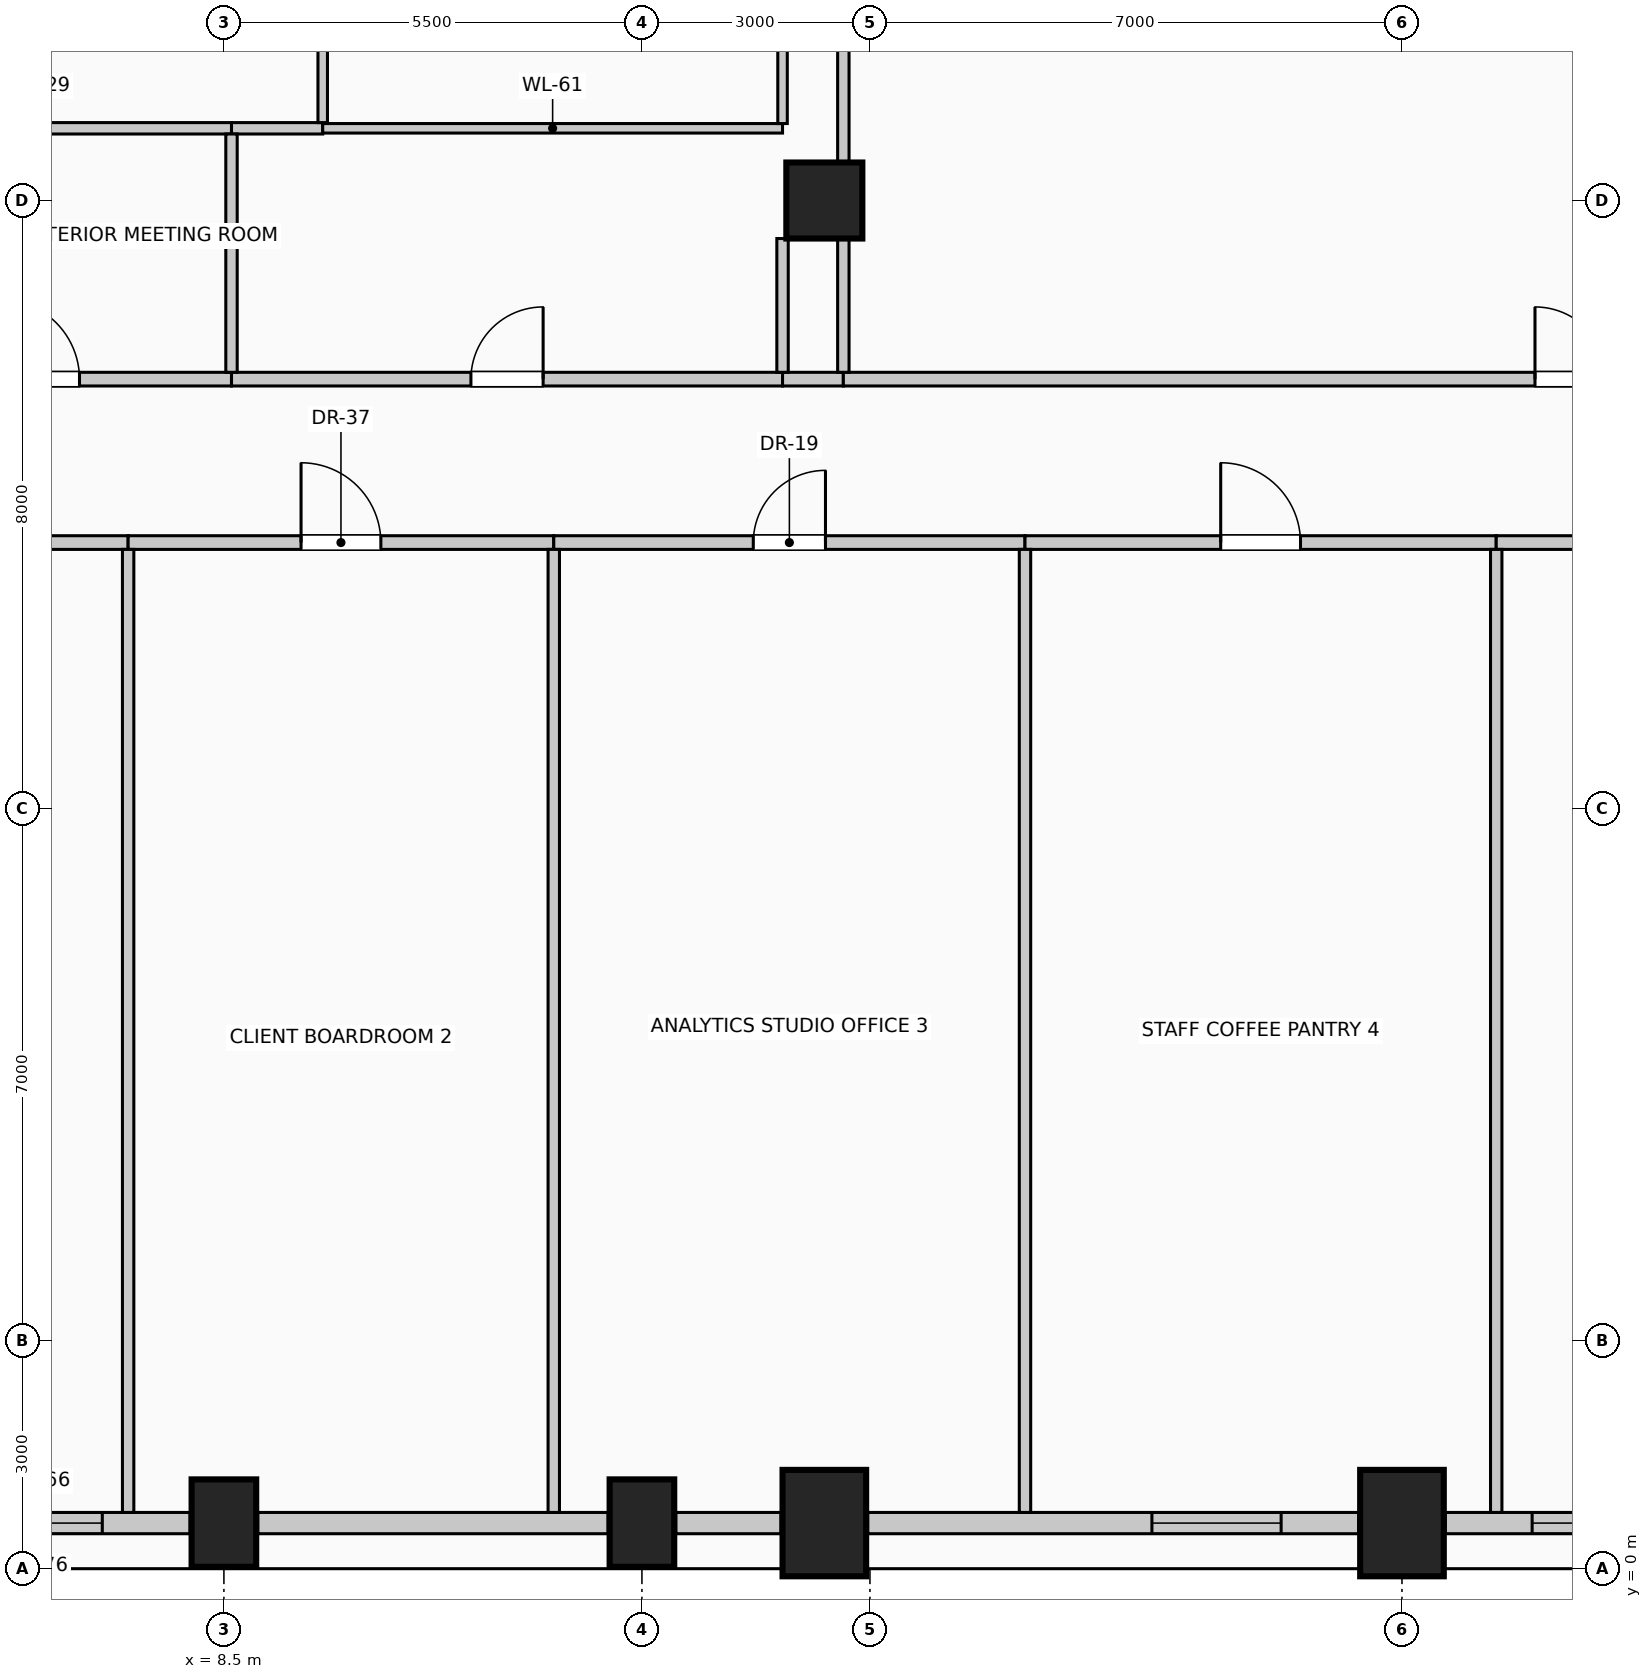
"""IFC4 building model, lengths in metres.
Left out: names, types, materials, properties, quantities, classifications, styles, units other than length and angle.
Written with IfcOpenShell. Run it as: python <this file> out.ifc"""

import sys

from ifc_helpers import new_model, si_unit, direction, frame, frame_2d, origin, origin_2d, place, context, subcontext, project, spatial, rectangle, circle, extrude, element, fill, save


model = new_model("IFC4")
c1 = context("Model", 3, precision=1e-05, world=origin(), true_north=direction((0.0, 1.0)))
c2 = subcontext(c1, "Body", "Model", "MODEL_VIEW")
j1 = project(units=[si_unit("LENGTHUNIT", "METRE"), si_unit("PLANEANGLEUNIT", "RADIAN")], contexts=[c1])
p1 = place(None, origin())
s1 = spatial("IfcSite", under=j1, at=p1, CompositionType="ELEMENT")
p2 = place(p1, origin())
s2 = spatial("IfcBuilding", under=s1, at=p2, CompositionType="ELEMENT")
p3 = place(p2, frame((0.0, 0.0, 144.6)))
s3 = spatial("IfcBuildingStorey", under=s2, at=p3, CompositionType="ELEMENT", Elevation=144.6)
for number, where, z_axis, x_axis in (
    (1, (8.5, 0.6, 0.0), (0.0, 0.0, 1.0), (1.0, 0.0, 0.0)),
    (2, (14.0, 0.6, 0.0), (0.0, 0.0, 1.0), (1.0, 0.0, 0.0)),
):
    element("IfcColumn", number, at=place(p3, frame(where, z_axis=z_axis, x_axis=x_axis)), inside=s3, PredefinedType="COLUMN", context=c2, shape_type="SweptSolid", body=[
        extrude(rectangle(XDim=0.85, YDim=1.15, at=origin_2d()), origin(), (0.0, 0.0, 1.0), 4.0),
    ])
for number, where, z_axis, x_axis in (
    (3, (16.4, 0.6, 0.0), (0.0, 0.0, 1.0), (1.0, 0.0, 0.0)),
    (4, (24.0, 0.6, 0.0), (0.0, 0.0, 1.0), (1.0, 0.0, 0.0)),
):
    element("IfcColumn", number, at=place(p3, frame(where, z_axis=z_axis, x_axis=x_axis)), inside=s3, PredefinedType="COLUMN", context=c2, shape_type="SweptSolid", body=[
        extrude(rectangle(XDim=1.1, YDim=1.4, at=origin_2d()), origin(), (0.0, 0.0, 1.0), 4.0),
    ])
p4 = place(p3, frame((16.4, 18.0, 0.0), z_axis=(0.0, 0.0, 1.0), x_axis=(1.0, 0.0, 0.0)))
e5 = element("IfcColumn", 5, at=p4, inside=s3, PredefinedType="COLUMN", context=c2, shape_type="SweptSolid", body=[
    extrude(circle(Radius=0.5, at=origin_2d()), origin(), (0.0, 0.0, 1.0), 4.0),
])
p5 = place(p3, frame((8.055, 0.6, 0.0), z_axis=(0.0, 0.0, 1.0), x_axis=(-1.0, 0.0, 0.0)))
e6 = element("IfcWall", 6, at=p5, inside=s3, PredefinedType="SOLIDWALL", context=c2, shape_type="SweptSolid", body=[
    extrude(rectangle(XDim=4.01, YDim=0.28, at=frame_2d((2.005, 0.0))), origin(), (0.0, 0.0, 1.0), 2.875),
])
p6 = place(p5, frame((1.155, 0.0, 0.5)))
e7 = element("IfcOpeningElement", 7, at=p6, cuts=e6, PredefinedType="OPENING", context=c2, shape_type="SweptSolid", body=[
    extrude(rectangle(XDim=1.7, YDim=1.95, at=frame_2d((0.85, 0.975))), frame((0.0, 0.15, 0.0), z_axis=(0.0, -1.0, 0.0), x_axis=(1.0, 0.0, 0.0)), (0.0, 0.0, 1.0), 0.3),
])
p7 = place(p3, frame((13.555, 0.6, 0.0), z_axis=(0.0, 0.0, 1.0), x_axis=(-1.0, 0.0, 0.0)))
e8 = element("IfcWall", 8, at=p7, inside=s3, PredefinedType="SOLIDWALL", context=c2, shape_type="SweptSolid", body=[
    extrude(rectangle(XDim=4.61, YDim=0.28, at=frame_2d((2.305, 0.0))), origin(), (0.0, 0.0, 1.0), 2.875),
])
p8 = place(p3, frame((15.83, 0.6, 0.0), z_axis=(0.0, 0.0, 1.0), x_axis=(-1.0, 0.0, 0.0)))
e9 = element("IfcWall", 9, at=p8, inside=s3, PredefinedType="SOLIDWALL", context=c2, shape_type="SweptSolid", body=[
    extrude(rectangle(XDim=1.385, YDim=0.28, at=frame_2d((0.692, 0.0))), origin(), (0.0, 0.0, 1.0), 2.875),
])
p9 = place(p3, frame((23.43, 0.6, 0.0), z_axis=(0.0, 0.0, 1.0), x_axis=(-1.0, 0.0, 0.0)))
e10 = element("IfcWall", 10, at=p9, inside=s3, PredefinedType="SOLIDWALL", context=c2, shape_type="SweptSolid", body=[
    extrude(rectangle(XDim=6.46, YDim=0.28, at=frame_2d((3.23, 0.0))), origin(), (0.0, 0.0, 1.0), 2.875),
])
p10 = place(p9, frame((1.02, 0.0, 0.5)))
e11 = element("IfcOpeningElement", 11, at=p10, cuts=e10, PredefinedType="OPENING", context=c2, shape_type="SweptSolid", body=[
    extrude(rectangle(XDim=1.7, YDim=1.95, at=frame_2d((0.85, 0.975))), frame((0.0, 0.15, 0.0), z_axis=(0.0, -1.0, 0.0), x_axis=(1.0, 0.0, 0.0)), (0.0, 0.0, 1.0), 0.3),
])
p11 = place(p3, frame((28.555, 0.6, 0.0), z_axis=(0.0, 0.0, 1.0), x_axis=(-1.0, 0.0, 0.0)))
e12 = element("IfcWall", 12, at=p11, inside=s3, PredefinedType="SOLIDWALL", context=c2, shape_type="SweptSolid", body=[
    extrude(rectangle(XDim=3.985, YDim=0.28, at=frame_2d((1.992, 0.0))), origin(), (0.0, 0.0, 1.0), 2.875),
])
p12 = place(p11, frame((1.143, 0.0, 0.5)))
e13 = element("IfcOpeningElement", 13, at=p12, cuts=e12, PredefinedType="OPENING", context=c2, shape_type="SweptSolid", body=[
    extrude(rectangle(XDim=1.7, YDim=1.95, at=frame_2d((0.85, 0.975))), frame((0.0, 0.15, 0.0), z_axis=(0.0, -1.0, 0.0), x_axis=(1.0, 0.0, 0.0)), (0.0, 0.0, 1.0), 0.3),
])
p13 = place(p3, frame((0.74, 13.5, 0.0), z_axis=(0.0, 0.0, 1.0), x_axis=(1.0, 0.0, 0.0)))
e14 = element("IfcWall", 14, at=p13, inside=s3, PredefinedType="PARTITIONING", context=c2, shape_type="SweptSolid", body=[
    extrude(rectangle(XDim=6.5, YDim=0.18, at=frame_2d((3.25, 0.0))), origin(), (0.0, 0.0, 1.0), 3.725),
])
p14 = place(p13, frame((2.775, 0.0, 0.0)))
e15 = element("IfcOpeningElement", 15, at=p14, cuts=e14, PredefinedType="OPENING", context=c2, shape_type="SweptSolid", body=[
    extrude(rectangle(XDim=0.95, YDim=2.15, at=frame_2d((0.475, 1.075))), frame((0.0, 0.1, 0.0), z_axis=(0.0, -1.0, 0.0), x_axis=(1.0, 0.0, 0.0)), (0.0, 0.0, 1.0), 0.2),
])
p15 = place(p3, frame((7.24, 13.5, 0.0), z_axis=(0.0, 0.0, 1.0), x_axis=(1.0, 0.0, 0.0)))
e16 = element("IfcWall", 16, at=p15, inside=s3, PredefinedType="PARTITIONING", context=c2, shape_type="SweptSolid", body=[
    extrude(rectangle(XDim=5.6, YDim=0.18, at=frame_2d((2.8, 0.0))), origin(), (0.0, 0.0, 1.0), 3.725),
])
p16 = place(p15, frame((2.275, 0.0, 0.0)))
e17 = element("IfcOpeningElement", 17, at=p16, cuts=e16, PredefinedType="OPENING", context=c2, shape_type="SweptSolid", body=[
    extrude(rectangle(XDim=1.05, YDim=2.15, at=frame_2d((0.525, 1.075))), frame((0.0, 0.1, 0.0), z_axis=(0.0, -1.0, 0.0), x_axis=(1.0, 0.0, 0.0)), (0.0, 0.0, 1.0), 0.2),
])
p17 = place(p3, frame((12.84, 13.5, 0.0), z_axis=(0.0, 0.0, 1.0), x_axis=(1.0, 0.0, 0.0)))
e18 = element("IfcWall", 18, at=p17, inside=s3, PredefinedType="PARTITIONING", context=c2, shape_type="SweptSolid", body=[
    extrude(rectangle(XDim=6.2, YDim=0.18, at=frame_2d((3.1, 0.0))), origin(), (0.0, 0.0, 1.0), 3.725),
])
p18 = place(p17, frame((2.625, 0.0, 0.0)))
e19 = element("IfcOpeningElement", 19, at=p18, cuts=e18, PredefinedType="OPENING", context=c2, shape_type="SweptSolid", body=[
    extrude(rectangle(XDim=0.95, YDim=2.15, at=frame_2d((0.475, 1.075))), frame((0.0, 0.1, 0.0), z_axis=(0.0, -1.0, 0.0), x_axis=(1.0, 0.0, 0.0)), (0.0, 0.0, 1.0), 0.2),
])
p19 = place(p3, frame((19.04, 13.5, 0.0), z_axis=(0.0, 0.0, 1.0), x_axis=(1.0, 0.0, 0.0)))
e20 = element("IfcWall", 20, at=p19, inside=s3, PredefinedType="PARTITIONING", context=c2, shape_type="SweptSolid", body=[
    extrude(rectangle(XDim=6.2, YDim=0.18, at=frame_2d((3.1, 0.0))), origin(), (0.0, 0.0, 1.0), 3.725),
])
p20 = place(p19, frame((2.575, 0.0, 0.0)))
e21 = element("IfcOpeningElement", 21, at=p20, cuts=e20, PredefinedType="OPENING", context=c2, shape_type="SweptSolid", body=[
    extrude(rectangle(XDim=1.05, YDim=2.15, at=frame_2d((0.525, 1.075))), frame((0.0, 0.1, 0.0), z_axis=(0.0, -1.0, 0.0), x_axis=(1.0, 0.0, 0.0)), (0.0, 0.0, 1.0), 0.2),
])
p21 = place(p3, frame((25.24, 13.5, 0.0), z_axis=(0.0, 0.0, 1.0), x_axis=(1.0, 0.0, 0.0)))
e22 = element("IfcWall", 22, at=p21, inside=s3, PredefinedType="PARTITIONING", context=c2, shape_type="SweptSolid", body=[
    extrude(rectangle(XDim=6.4, YDim=0.18, at=frame_2d((3.2, 0.0))), origin(), (0.0, 0.0, 1.0), 3.725),
])
p22 = place(p21, frame((2.725, 0.0, 0.0)))
e23 = element("IfcOpeningElement", 23, at=p22, cuts=e22, PredefinedType="OPENING", context=c2, shape_type="SweptSolid", body=[
    extrude(rectangle(XDim=0.95, YDim=2.15, at=frame_2d((0.475, 1.075))), frame((0.0, 0.1, 0.0), z_axis=(0.0, -1.0, 0.0), x_axis=(1.0, 0.0, 0.0)), (0.0, 0.0, 1.0), 0.2),
])
p23 = place(p3, frame((3.55, 15.65, 0.0), z_axis=(0.0, 0.0, 1.0), x_axis=(1.0, 0.0, 0.0)))
e24 = element("IfcWall", 24, at=p23, inside=s3, PredefinedType="PARTITIONING", context=c2, shape_type="SweptSolid", body=[
    extrude(rectangle(XDim=5.05, YDim=0.18, at=frame_2d((2.525, 0.0))), origin(), (0.0, 0.0, 1.0), 3.725),
])
p24 = place(p23, frame((2.0, 0.0, 0.0)))
e25 = element("IfcOpeningElement", 25, at=p24, cuts=e24, PredefinedType="OPENING", context=c2, shape_type="SweptSolid", body=[
    extrude(rectangle(XDim=1.05, YDim=2.15, at=frame_2d((0.525, 1.075))), frame((0.0, 0.1, 0.0), z_axis=(0.0, -1.0, 0.0), x_axis=(1.0, 0.0, 0.0)), (0.0, 0.0, 1.0), 0.2),
])
p25 = place(p3, frame((8.6, 15.65, 0.0), z_axis=(0.0, 0.0, 1.0), x_axis=(1.0, 0.0, 0.0)))
e26 = element("IfcWall", 26, at=p25, inside=s3, PredefinedType="PARTITIONING", context=c2, shape_type="SweptSolid", body=[
    extrude(rectangle(XDim=7.25, YDim=0.18, at=frame_2d((3.625, 0.0))), origin(), (0.0, 0.0, 1.0), 3.725),
])
p26 = place(p25, frame((3.15, 0.0, 0.0)))
e27 = element("IfcOpeningElement", 27, at=p26, cuts=e26, PredefinedType="OPENING", context=c2, shape_type="SweptSolid", body=[
    extrude(rectangle(XDim=0.95, YDim=2.15, at=frame_2d((0.475, 1.075))), frame((0.0, 0.1, 0.0), z_axis=(0.0, -1.0, 0.0), x_axis=(1.0, 0.0, 0.0)), (0.0, 0.0, 1.0), 0.2),
])
p27 = place(p3, frame((15.85, 15.65, 0.0), z_axis=(0.0, 0.0, 1.0), x_axis=(1.0, 0.0, 0.0)))
e28 = element("IfcWall", 28, at=p27, inside=s3, PredefinedType="PARTITIONING", context=c2, shape_type="SweptSolid", body=[
    extrude(rectangle(XDim=0.8, YDim=0.18, at=frame_2d((0.4, 0.0))), origin(), (0.0, 0.0, 1.0), 3.725),
])
p28 = place(p3, frame((16.65, 15.65, 0.0), z_axis=(0.0, 0.0, 1.0), x_axis=(1.0, 0.0, 0.0)))
e29 = element("IfcWall", 29, at=p28, inside=s3, PredefinedType="PARTITIONING", context=c2, shape_type="SweptSolid", body=[
    extrude(rectangle(XDim=19.15, YDim=0.18, at=frame_2d((9.575, 0.0))), origin(), (0.0, 0.0, 1.0), 3.725),
])
p29 = place(p28, frame((9.1, 0.0, 0.0)))
e30 = element("IfcOpeningElement", 30, at=p29, cuts=e29, PredefinedType="OPENING", context=c2, shape_type="SweptSolid", body=[
    extrude(rectangle(XDim=0.95, YDim=2.15, at=frame_2d((0.475, 1.075))), frame((0.0, 0.1, 0.0), z_axis=(0.0, -1.0, 0.0), x_axis=(1.0, 0.0, 0.0)), (0.0, 0.0, 1.0), 0.2),
])
p30 = place(p3, frame((3.55, 18.95, 0.0), z_axis=(0.0, 0.0, 1.0), x_axis=(1.0, 0.0, 0.0)))
e31 = element("IfcWall", 31, at=p30, inside=s3, PredefinedType="PARTITIONING", context=c2, shape_type="SweptSolid", body=[
    extrude(rectangle(XDim=5.05, YDim=0.15, at=frame_2d((2.525, 0.0))), origin(), (0.0, 0.0, 1.0), 3.725),
])
p31 = place(p3, frame((8.6, 18.95, 0.0), z_axis=(0.0, 0.0, 1.0), x_axis=(1.0, 0.0, 0.0)))
e32 = element("IfcWall", 32, at=p31, inside=s3, PredefinedType="PARTITIONING", context=c2, shape_type="SweptSolid", body=[
    extrude(rectangle(XDim=1.2, YDim=0.15, at=frame_2d((0.6, 0.0))), origin(), (0.0, 0.0, 1.0), 3.725),
])
p32 = place(p3, frame((9.8, 18.95, 0.0), z_axis=(0.0, 0.0, 1.0), x_axis=(1.0, 0.0, 0.0)))
e33 = element("IfcWall", 33, at=p32, inside=s3, PredefinedType="PARTITIONING", context=c2, shape_type="SweptSolid", body=[
    extrude(rectangle(XDim=6.05, YDim=0.125, at=frame_2d((3.025, 0.0))), origin(), (0.0, 0.0, 1.0), 3.725),
])
p33 = place(p3, frame((7.24, 0.74, 0.0), z_axis=(0.0, 0.0, 1.0), x_axis=(0.0, 1.0, 0.0)))
e34 = element("IfcWall", 34, at=p33, inside=s3, PredefinedType="PARTITIONING", context=c2, shape_type="SweptSolid", body=[
    extrude(rectangle(XDim=12.67, YDim=0.15, at=frame_2d((6.335, 0.0))), origin(), (0.0, 0.0, 1.0), 3.725),
])
p34 = place(p3, frame((8.6, 15.74, 0.0), z_axis=(0.0, 0.0, 1.0), x_axis=(0.0, 1.0, 0.0)))
e35 = element("IfcWall", 35, at=p34, inside=s3, PredefinedType="PARTITIONING", context=c2, shape_type="SweptSolid", body=[
    extrude(rectangle(XDim=3.135, YDim=0.15, at=frame_2d((1.567, 0.0))), origin(), (0.0, 0.0, 1.0), 3.725),
])
p35 = place(p3, frame((9.8, 19.025, 0.0), z_axis=(0.0, 0.0, 1.0), x_axis=(0.0, 1.0, 0.0)))
e36 = element("IfcWall", 36, at=p35, inside=s3, PredefinedType="PARTITIONING", context=c2, shape_type="SweptSolid", body=[
    extrude(rectangle(XDim=5.7, YDim=0.125, at=frame_2d((2.85, 0.0))), origin(), (0.0, 0.0, 1.0), 3.725),
])
p36 = place(p3, frame((12.84, 0.74, 0.0), z_axis=(0.0, 0.0, 1.0), x_axis=(0.0, 1.0, 0.0)))
e37 = element("IfcWall", 37, at=p36, inside=s3, PredefinedType="PARTITIONING", context=c2, shape_type="SweptSolid", body=[
    extrude(rectangle(XDim=12.67, YDim=0.15, at=frame_2d((6.335, 0.0))), origin(), (0.0, 0.0, 1.0), 3.725),
])
p37 = place(p3, frame((15.85, 15.74, 0.0), z_axis=(0.0, 0.0, 1.0), x_axis=(0.0, 1.0, 0.0)))
e38 = element("IfcWall", 38, at=p37, inside=s3, PredefinedType="PARTITIONING", context=c2, shape_type="SweptSolid", body=[
    extrude(rectangle(XDim=1.76, YDim=0.15, at=frame_2d((0.88, 0.0))), origin(), (0.0, 0.0, 1.0), 3.725),
])
p38 = place(p3, frame((15.85, 19.012, 0.0), z_axis=(0.0, 0.0, 1.0), x_axis=(0.0, 1.0, 0.0)))
e39 = element("IfcWall", 39, at=p38, inside=s3, PredefinedType="PARTITIONING", context=c2, shape_type="SweptSolid", body=[
    extrude(rectangle(XDim=5.725, YDim=0.125, at=frame_2d((2.863, 0.0))), origin(), (0.0, 0.0, 1.0), 3.725),
])
p39 = place(p3, frame((16.65, 15.74, 0.0), z_axis=(0.0, 0.0, 1.0), x_axis=(0.0, 1.0, 0.0)))
e40 = element("IfcWall", 40, at=p39, inside=s3, PredefinedType="PARTITIONING", context=c2, shape_type="SweptSolid", body=[
    extrude(rectangle(XDim=1.76, YDim=0.15, at=frame_2d((0.88, 0.0))), origin(), (0.0, 0.0, 1.0), 3.07),
])
p40 = place(p3, frame((16.65, 18.5, 0.0), z_axis=(0.0, 0.0, 1.0), x_axis=(0.0, 1.0, 0.0)))
e41 = element("IfcWall", 41, at=p40, inside=s3, PredefinedType="PARTITIONING", context=c2, shape_type="SweptSolid", body=[
    extrude(rectangle(XDim=6.425, YDim=0.15, at=frame_2d((3.212, 0.0))), origin(), (0.0, 0.0, 1.0), 3.07),
])
for number, where, z_axis, x_axis in (
    (42, (19.04, 0.74, 0.0), (0.0, 0.0, 1.0), (0.0, 1.0, 0.0)),
    (43, (25.24, 0.74, 0.0), (0.0, 0.0, 1.0), (0.0, 1.0, 0.0)),
):
    element("IfcWall", number, at=place(p3, frame(where, z_axis=z_axis, x_axis=x_axis)), inside=s3, PredefinedType="PARTITIONING", context=c2, shape_type="SweptSolid", body=[
        extrude(rectangle(XDim=12.67, YDim=0.15, at=frame_2d((6.335, 0.0))), origin(), (0.0, 0.0, 1.0), 3.725),
    ])
p41 = place(p6, origin())
e44 = element("IfcWindow", 44, at=p41, inside=s3, PartitioningType="SINGLE_PANEL", PredefinedType="WINDOW", context=c2, shape_type="SweptSolid", body=[
    extrude(rectangle(XDim=1.7, YDim=1.95, at=frame_2d((0.85, 0.975))), frame((0.0, 0.03, 0.0), z_axis=(0.0, -1.0, 0.0), x_axis=(1.0, 0.0, 0.0)), (0.0, 0.0, 1.0), 0.06),
])
fill(e7, e44)
p42 = place(p10, origin())
e45 = element("IfcWindow", 45, at=p42, inside=s3, PartitioningType="SINGLE_PANEL", PredefinedType="WINDOW", context=c2, shape_type="SweptSolid", body=[
    extrude(rectangle(XDim=1.7, YDim=1.95, at=frame_2d((0.85, 0.975))), frame((0.0, 0.03, 0.0), z_axis=(0.0, -1.0, 0.0), x_axis=(1.0, 0.0, 0.0)), (0.0, 0.0, 1.0), 0.06),
])
fill(e11, e45)
p43 = place(p12, origin())
e46 = element("IfcWindow", 46, at=p43, inside=s3, PartitioningType="SINGLE_PANEL", PredefinedType="WINDOW", context=c2, shape_type="SweptSolid", body=[
    extrude(rectangle(XDim=1.7, YDim=1.95, at=frame_2d((0.85, 0.975))), frame((0.0, 0.03, 0.0), z_axis=(0.0, -1.0, 0.0), x_axis=(1.0, 0.0, 0.0)), (0.0, 0.0, 1.0), 0.06),
])
fill(e13, e46)
p44 = place(p16, origin())
e47 = element("IfcDoor", 47, at=p44, inside=s3, OperationType="SINGLE_SWING_LEFT", PredefinedType="DOOR", context=c2, shape_type="SweptSolid", body=[
    extrude(rectangle(XDim=1.05, YDim=2.15, at=frame_2d((0.525, 1.075))), frame((0.0, 0.025, 0.0), z_axis=(0.0, -1.0, 0.0), x_axis=(1.0, 0.0, 0.0)), (0.0, 0.0, 1.0), 0.05),
])
fill(e17, e47)
p45 = place(p18, origin())
e48 = element("IfcDoor", 48, at=p45, inside=s3, OperationType="SINGLE_SWING_RIGHT", PredefinedType="DOOR", context=c2, shape_type="SweptSolid", body=[
    extrude(rectangle(XDim=0.95, YDim=2.15, at=frame_2d((0.475, 1.075))), frame((0.0, 0.025, 0.0), z_axis=(0.0, -1.0, 0.0), x_axis=(1.0, 0.0, 0.0)), (0.0, 0.0, 1.0), 0.05),
])
fill(e19, e48)
p46 = place(p20, origin())
e49 = element("IfcDoor", 49, at=p46, inside=s3, OperationType="SINGLE_SWING_LEFT", PredefinedType="DOOR", context=c2, shape_type="SweptSolid", body=[
    extrude(rectangle(XDim=1.05, YDim=2.15, at=frame_2d((0.525, 1.075))), frame((0.0, 0.025, 0.0), z_axis=(0.0, -1.0, 0.0), x_axis=(1.0, 0.0, 0.0)), (0.0, 0.0, 1.0), 0.05),
])
fill(e21, e49)
p47 = place(p24, origin())
e50 = element("IfcDoor", 50, at=p47, inside=s3, OperationType="SINGLE_SWING_LEFT", PredefinedType="DOOR", context=c2, shape_type="SweptSolid", body=[
    extrude(rectangle(XDim=1.05, YDim=2.15, at=frame_2d((0.525, 1.075))), frame((0.0, 0.025, 0.0), z_axis=(0.0, -1.0, 0.0), x_axis=(1.0, 0.0, 0.0)), (0.0, 0.0, 1.0), 0.05),
])
fill(e25, e50)
p48 = place(p26, origin())
e51 = element("IfcDoor", 51, at=p48, inside=s3, OperationType="SINGLE_SWING_RIGHT", PredefinedType="DOOR", context=c2, shape_type="SweptSolid", body=[
    extrude(rectangle(XDim=0.95, YDim=2.15, at=frame_2d((0.475, 1.075))), frame((0.0, 0.025, 0.0), z_axis=(0.0, -1.0, 0.0), x_axis=(1.0, 0.0, 0.0)), (0.0, 0.0, 1.0), 0.05),
])
fill(e27, e51)
p49 = place(p29, origin())
e52 = element("IfcDoor", 52, at=p49, inside=s3, OperationType="SINGLE_SWING_LEFT", PredefinedType="DOOR", context=c2, shape_type="SweptSolid", body=[
    extrude(rectangle(XDim=0.95, YDim=2.15, at=frame_2d((0.475, 1.075))), frame((0.0, 0.025, 0.0), z_axis=(0.0, -1.0, 0.0), x_axis=(1.0, 0.0, 0.0)), (0.0, 0.0, 1.0), 0.05),
])
fill(e30, e52)
save(model, sys.argv[1])
